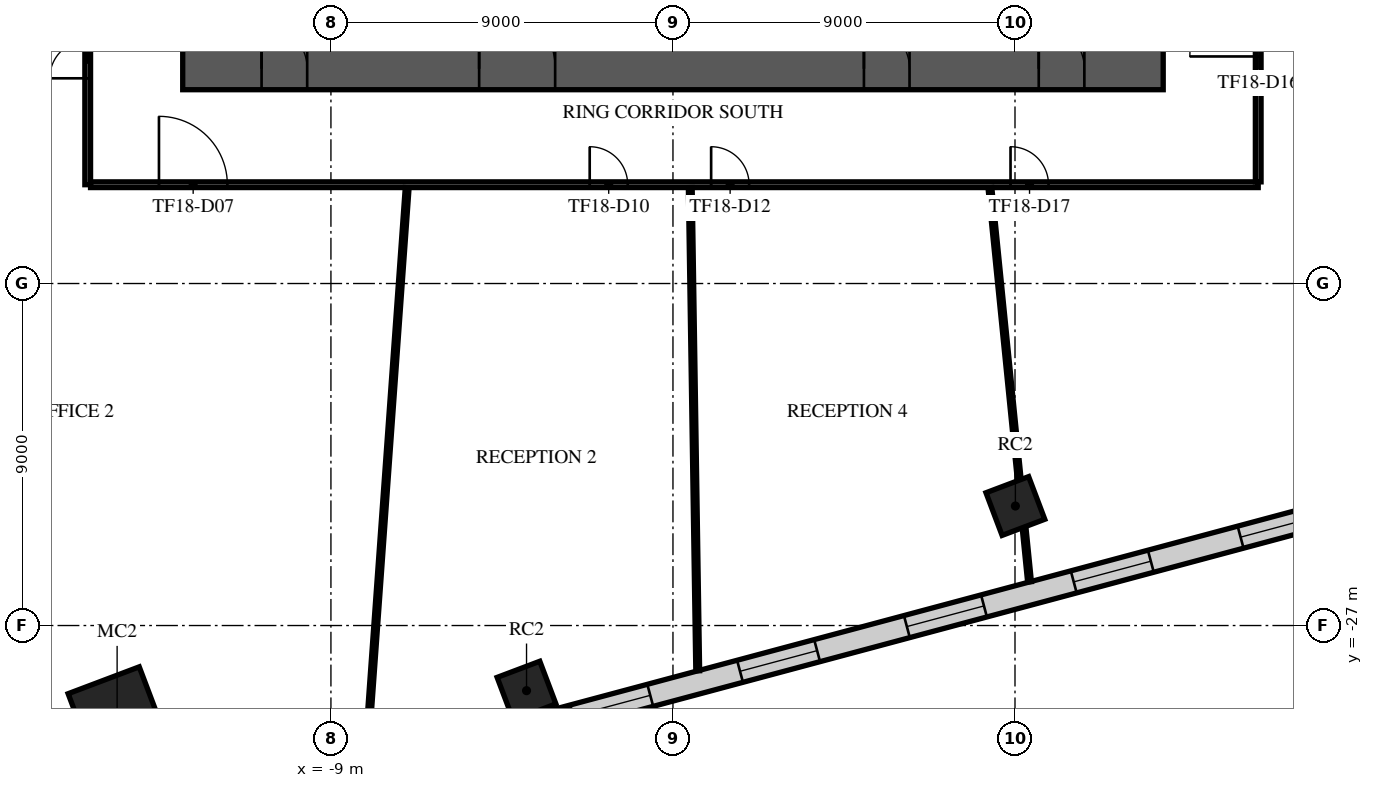
"""IFC4 building model, lengths in metres.
Left out: names, types, materials, properties, quantities, classifications, styles, units other than length and angle.
Written with IfcOpenShell. Run it as: python <this file> out.ifc"""

import sys

from ifc_helpers import new_model, si_unit, direction, frame, frame_2d, origin, origin_2d, place, context, subcontext, project, spatial, rectangle, extrude, element, fill, save


model = new_model("IFC4")
c1 = context("Model", 3, precision=1e-05, world=origin(), true_north=direction((0.0, 1.0)))
c2 = subcontext(c1, "Body", "Model", "MODEL_VIEW")
j1 = project(units=[si_unit("LENGTHUNIT", "METRE"), si_unit("PLANEANGLEUNIT", "RADIAN")], contexts=[c1])
p1 = place(None, origin())
s1 = spatial("IfcSite", under=j1, at=p1, CompositionType="ELEMENT")
p2 = place(p1, origin())
s2 = spatial("IfcBuilding", under=s1, at=p2, CompositionType="ELEMENT")
p3 = place(p2, frame((0.0, 0.0, 86.1)))
s3 = spatial("IfcBuildingStorey", under=s2, at=p3, CompositionType="ELEMENT", Elevation=86.1)
p4 = place(p3, frame((-14.626, -29.376, 0.0), z_axis=(0.0, 0.0, 1.0), x_axis=(0.935491525991, 0.353349125935, 0.0)))
e1 = element("IfcColumn", 1, at=p4, inside=s3, PredefinedType="COLUMN", context=c2, shape_type="SweptSolid", body=[
    extrude(rectangle(XDim=2.0, YDim=2.0, at=origin_2d()), origin(), (0.0, 0.0, 1.0), 4.0),
])
for number, where, z_axis, x_axis in (
    (2, (-3.853, -28.714, 0.0), (0.0, 0.0, 1.0), (0.935, 0.353, 0.0)),
    (3, (9.01, -23.855, 0.0), (0.0, 0.0, 1.0), (0.935, 0.353, 0.0)),
):
    element("IfcColumn", number, at=place(p3, frame(where, z_axis=z_axis, x_axis=x_axis)), inside=s3, PredefinedType="COLUMN", context=c2, shape_type="SweptSolid", body=[
        extrude(rectangle(XDim=1.2, YDim=1.2, at=origin_2d()), origin(), (0.0, 0.0, 1.0), 4.0),
    ])
p5 = place(p3, frame((-12.9, -12.35, 0.0), z_axis=(0.0, 0.0, 1.0), x_axis=(1.0, 0.0, 0.0)))
e4 = element("IfcWall", 4, at=p5, inside=s3, PredefinedType="SHEAR", context=c2, shape_type="SweptSolid", body=[
    extrude(rectangle(XDim=25.8, YDim=1.1, at=frame_2d((12.9, 0.0))), origin(), (0.0, 0.0, 1.0), 3.58),
])
p6 = place(p5, frame((7.8, 0.0, 0.0)))
e5 = element("IfcOpeningElement", 5, at=p6, cuts=e4, PredefinedType="OPENING", context=c2, shape_type="SweptSolid", body=[
    extrude(rectangle(XDim=2.0, YDim=2.1, at=frame_2d((1.0, 1.05))), frame((0.0, 0.56, 0.0), z_axis=(0.0, -1.0, 0.0), x_axis=(1.0, 0.0, 0.0)), (0.0, 0.0, 1.0), 1.12),
])
p7 = place(p5, frame((17.925, 0.0, 0.0)))
e6 = element("IfcOpeningElement", 6, at=p7, cuts=e4, PredefinedType="OPENING", context=c2, shape_type="SweptSolid", body=[
    extrude(rectangle(XDim=1.2, YDim=2.1, at=frame_2d((0.6, 1.05))), frame((0.0, 0.56, 0.0), z_axis=(0.0, -1.0, 0.0), x_axis=(1.0, 0.0, 0.0)), (0.0, 0.0, 1.0), 1.12),
])
p8 = place(p5, frame((2.075, 0.0, 0.0)))
e7 = element("IfcOpeningElement", 7, at=p8, cuts=e4, PredefinedType="OPENING", context=c2, shape_type="SweptSolid", body=[
    extrude(rectangle(XDim=1.2, YDim=2.1, at=frame_2d((0.6, 1.05))), frame((0.0, 0.56, 0.0), z_axis=(0.0, -1.0, 0.0), x_axis=(1.0, 0.0, 0.0)), (0.0, 0.0, 1.0), 1.12),
])
p9 = place(p5, frame((22.525, 0.0, 0.0)))
e8 = element("IfcOpeningElement", 8, at=p9, cuts=e4, PredefinedType="OPENING", context=c2, shape_type="SweptSolid", body=[
    extrude(rectangle(XDim=1.2, YDim=2.1, at=frame_2d((0.6, 1.05))), frame((0.0, 0.56, 0.0), z_axis=(0.0, -1.0, 0.0), x_axis=(1.0, 0.0, 0.0)), (0.0, 0.0, 1.0), 1.12),
])
p10 = place(p3, frame((-16.859, -33.195, 0.0), z_axis=(0.0, 0.0, 1.0), x_axis=(0.965925643605, 0.258819726887, 0.0)))
e9 = element("IfcWall", 9, at=p10, inside=s3, PredefinedType="STANDARD", context=c2, shape_type="SweptSolid", body=[
    extrude(rectangle(XDim=49.752, YDim=0.6, at=frame_2d((24.876, 0.0))), origin(), (0.0, 0.0, 1.0), 3.58),
])
p11 = place(p10, frame((1.161, 0.0, 0.9)))
e10 = element("IfcOpeningElement", 10, at=p11, cuts=e9, PredefinedType="OPENING", context=c2, shape_type="SweptSolid", body=[
    extrude(rectangle(XDim=2.1, YDim=2.1, at=frame_2d((1.05, 1.05))), frame((0.0, 0.31, 0.0), z_axis=(0.0, -1.0, 0.0), x_axis=(1.0, 0.0, 0.0)), (0.0, 0.0, 1.0), 0.62),
])
p12 = place(p10, frame((5.644, 0.0, 0.9)))
e11 = element("IfcOpeningElement", 11, at=p12, cuts=e9, PredefinedType="OPENING", context=c2, shape_type="SweptSolid", body=[
    extrude(rectangle(XDim=2.1, YDim=2.1, at=frame_2d((1.05, 1.05))), frame((0.0, 0.31, 0.0), z_axis=(0.0, -1.0, 0.0), x_axis=(1.0, 0.0, 0.0)), (0.0, 0.0, 1.0), 0.62),
])
p13 = place(p10, frame((10.189, 0.0, 0.9)))
e12 = element("IfcOpeningElement", 12, at=p13, cuts=e9, PredefinedType="OPENING", context=c2, shape_type="SweptSolid", body=[
    extrude(rectangle(XDim=2.1, YDim=2.1, at=frame_2d((1.05, 1.05))), frame((0.0, 0.31, 0.0), z_axis=(0.0, -1.0, 0.0), x_axis=(1.0, 0.0, 0.0)), (0.0, 0.0, 1.0), 0.62),
])
p14 = place(p10, frame((14.735, 0.0, 0.9)))
e13 = element("IfcOpeningElement", 13, at=p14, cuts=e9, PredefinedType="OPENING", context=c2, shape_type="SweptSolid", body=[
    extrude(rectangle(XDim=2.1, YDim=2.1, at=frame_2d((1.05, 1.05))), frame((0.0, 0.31, 0.0), z_axis=(0.0, -1.0, 0.0), x_axis=(1.0, 0.0, 0.0)), (0.0, 0.0, 1.0), 0.62),
])
p15 = place(p10, frame((19.28, 0.0, 0.9)))
e14 = element("IfcOpeningElement", 14, at=p15, cuts=e9, PredefinedType="OPENING", context=c2, shape_type="SweptSolid", body=[
    extrude(rectangle(XDim=2.1, YDim=2.1, at=frame_2d((1.05, 1.05))), frame((0.0, 0.31, 0.0), z_axis=(0.0, -1.0, 0.0), x_axis=(1.0, 0.0, 0.0)), (0.0, 0.0, 1.0), 0.62),
])
p16 = place(p10, frame((23.826, 0.0, 0.9)))
e15 = element("IfcOpeningElement", 15, at=p16, cuts=e9, PredefinedType="OPENING", context=c2, shape_type="SweptSolid", body=[
    extrude(rectangle(XDim=2.1, YDim=2.1, at=frame_2d((1.05, 1.05))), frame((0.0, 0.31, 0.0), z_axis=(0.0, -1.0, 0.0), x_axis=(1.0, 0.0, 0.0)), (0.0, 0.0, 1.0), 0.62),
])
p17 = place(p10, frame((28.371, 0.0, 0.9)))
e16 = element("IfcOpeningElement", 16, at=p17, cuts=e9, PredefinedType="OPENING", context=c2, shape_type="SweptSolid", body=[
    extrude(rectangle(XDim=2.1, YDim=2.1, at=frame_2d((1.05, 1.05))), frame((0.0, 0.31, 0.0), z_axis=(0.0, -1.0, 0.0), x_axis=(1.0, 0.0, 0.0)), (0.0, 0.0, 1.0), 0.62),
])
p18 = place(p10, frame((32.917, 0.0, 0.9)))
e17 = element("IfcOpeningElement", 17, at=p18, cuts=e9, PredefinedType="OPENING", context=c2, shape_type="SweptSolid", body=[
    extrude(rectangle(XDim=2.1, YDim=2.1, at=frame_2d((1.05, 1.05))), frame((0.0, 0.31, 0.0), z_axis=(0.0, -1.0, 0.0), x_axis=(1.0, 0.0, 0.0)), (0.0, 0.0, 1.0), 0.62),
])
p19 = place(p10, frame((37.462, 0.0, 0.9)))
e18 = element("IfcOpeningElement", 18, at=p19, cuts=e9, PredefinedType="OPENING", context=c2, shape_type="SweptSolid", body=[
    extrude(rectangle(XDim=2.1, YDim=2.1, at=frame_2d((1.05, 1.05))), frame((0.0, 0.31, 0.0), z_axis=(0.0, -1.0, 0.0), x_axis=(1.0, 0.0, 0.0)), (0.0, 0.0, 1.0), 0.62),
])
p20 = place(p10, frame((42.008, 0.0, 0.9)))
e19 = element("IfcOpeningElement", 19, at=p20, cuts=e9, PredefinedType="OPENING", context=c2, shape_type="SweptSolid", body=[
    extrude(rectangle(XDim=2.1, YDim=2.1, at=frame_2d((1.05, 1.05))), frame((0.0, 0.31, 0.0), z_axis=(0.0, -1.0, 0.0), x_axis=(1.0, 0.0, 0.0)), (0.0, 0.0, 1.0), 0.62),
])
p21 = place(p10, frame((46.491, 0.0, 0.9)))
e20 = element("IfcOpeningElement", 20, at=p21, cuts=e9, PredefinedType="OPENING", context=c2, shape_type="SweptSolid", body=[
    extrude(rectangle(XDim=2.1, YDim=2.1, at=frame_2d((1.05, 1.05))), frame((0.0, 0.31, 0.0), z_axis=(0.0, -1.0, 0.0), x_axis=(1.0, 0.0, 0.0)), (0.0, 0.0, 1.0), 0.62),
])
p22 = place(p3, frame((-15.4, -15.4, 0.0), z_axis=(0.0, 0.0, 1.0), x_axis=(0.0, 1.0, 0.0)))
e21 = element("IfcWall", 21, at=p22, inside=s3, PredefinedType="PARTITIONING", context=c2, shape_type="SweptSolid", body=[
    extrude(rectangle(XDim=30.8, YDim=0.15, at=frame_2d((15.4, 0.0))), origin(), (0.0, 0.0, 1.0), 3.08),
])
p23 = place(p22, frame((21.677, 0.0, 0.0)))
e22 = element("IfcOpeningElement", 22, at=p23, cuts=e21, PredefinedType="OPENING", context=c2, shape_type="SweptSolid", body=[
    extrude(rectangle(XDim=1.8, YDim=2.1, at=frame_2d((0.9, 1.05))), frame((0.0, 0.085, 0.0), z_axis=(0.0, -1.0, 0.0), x_axis=(1.0, 0.0, 0.0)), (0.0, 0.0, 1.0), 0.17),
])
p24 = place(p22, frame((17.927, 0.0, 0.0)))
e23 = element("IfcOpeningElement", 23, at=p24, cuts=e21, PredefinedType="OPENING", context=c2, shape_type="SweptSolid", body=[
    extrude(rectangle(XDim=1.0, YDim=2.1, at=frame_2d((0.5, 1.05))), frame((0.0, 0.085, 0.0), z_axis=(0.0, -1.0, 0.0), x_axis=(1.0, 0.0, 0.0)), (0.0, 0.0, 1.0), 0.17),
])
p25 = place(p22, frame((15.322, 0.0, 0.0)))
e24 = element("IfcOpeningElement", 24, at=p25, cuts=e21, PredefinedType="OPENING", context=c2, shape_type="SweptSolid", body=[
    extrude(rectangle(XDim=1.0, YDim=2.1, at=frame_2d((0.5, 1.05))), frame((0.0, 0.085, 0.0), z_axis=(0.0, -1.0, 0.0), x_axis=(1.0, 0.0, 0.0)), (0.0, 0.0, 1.0), 0.17),
])
p26 = place(p22, frame((6.348, 0.0, 0.0)))
e25 = element("IfcOpeningElement", 25, at=p26, cuts=e21, PredefinedType="OPENING", context=c2, shape_type="SweptSolid", body=[
    extrude(rectangle(XDim=1.0, YDim=2.1, at=frame_2d((0.5, 1.05))), frame((0.0, 0.085, 0.0), z_axis=(0.0, -1.0, 0.0), x_axis=(1.0, 0.0, 0.0)), (0.0, 0.0, 1.0), 0.17),
])
p27 = place(p22, frame((27.605, 0.0, 0.0)))
e26 = element("IfcOpeningElement", 26, at=p27, cuts=e21, PredefinedType="OPENING", context=c2, shape_type="SweptSolid", body=[
    extrude(rectangle(XDim=1.0, YDim=2.1, at=frame_2d((0.5, 1.05))), frame((0.0, 0.085, 0.0), z_axis=(0.0, -1.0, 0.0), x_axis=(1.0, 0.0, 0.0)), (0.0, 0.0, 1.0), 0.17),
])
p28 = place(p22, frame((2.8, 0.0, 0.0)))
e27 = element("IfcOpeningElement", 27, at=p28, cuts=e21, PredefinedType="OPENING", context=c2, shape_type="SweptSolid", body=[
    extrude(rectangle(XDim=1.0, YDim=2.1, at=frame_2d((0.5, 1.05))), frame((0.0, 0.085, 0.0), z_axis=(0.0, -1.0, 0.0), x_axis=(1.0, 0.0, 0.0)), (0.0, 0.0, 1.0), 0.17),
])
p29 = place(p3, frame((-15.325, -15.4, 0.0), z_axis=(0.0, 0.0, 1.0), x_axis=(1.0, 0.0, 0.0)))
e28 = element("IfcWall", 28, at=p29, inside=s3, PredefinedType="PARTITIONING", context=c2, shape_type="SweptSolid", body=[
    extrude(rectangle(XDim=30.725, YDim=0.15, at=frame_2d((15.362, 0.0))), origin(), (0.0, 0.0, 1.0), 3.08),
])
p30 = place(p29, frame((1.8, 0.0, 0.0)))
e29 = element("IfcOpeningElement", 29, at=p30, cuts=e28, PredefinedType="OPENING", context=c2, shape_type="SweptSolid", body=[
    extrude(rectangle(XDim=1.8, YDim=2.1, at=frame_2d((0.9, 1.05))), frame((0.0, 0.085, 0.0), z_axis=(0.0, -1.0, 0.0), x_axis=(1.0, 0.0, 0.0)), (0.0, 0.0, 1.0), 0.17),
])
p31 = place(p29, frame((13.134, 0.0, 0.0)))
e30 = element("IfcOpeningElement", 30, at=p31, cuts=e28, PredefinedType="OPENING", context=c2, shape_type="SweptSolid", body=[
    extrude(rectangle(XDim=1.0, YDim=2.1, at=frame_2d((0.5, 1.05))), frame((0.0, 0.085, 0.0), z_axis=(0.0, -1.0, 0.0), x_axis=(1.0, 0.0, 0.0)), (0.0, 0.0, 1.0), 0.17),
])
p32 = place(p29, frame((16.329, 0.0, 0.0)))
e31 = element("IfcOpeningElement", 31, at=p32, cuts=e28, PredefinedType="OPENING", context=c2, shape_type="SweptSolid", body=[
    extrude(rectangle(XDim=1.0, YDim=2.1, at=frame_2d((0.5, 1.05))), frame((0.0, 0.085, 0.0), z_axis=(0.0, -1.0, 0.0), x_axis=(1.0, 0.0, 0.0)), (0.0, 0.0, 1.0), 0.17),
])
p33 = place(p29, frame((24.208, 0.0, 0.0)))
e32 = element("IfcOpeningElement", 32, at=p33, cuts=e28, PredefinedType="OPENING", context=c2, shape_type="SweptSolid", body=[
    extrude(rectangle(XDim=1.0, YDim=2.1, at=frame_2d((0.5, 1.05))), frame((0.0, 0.085, 0.0), z_axis=(0.0, -1.0, 0.0), x_axis=(1.0, 0.0, 0.0)), (0.0, 0.0, 1.0), 0.17),
])
p34 = place(p3, frame((15.4, -15.325, 0.0), z_axis=(0.0, 0.0, 1.0), x_axis=(0.0, 1.0, 0.0)))
e33 = element("IfcWall", 33, at=p34, inside=s3, PredefinedType="PARTITIONING", context=c2, shape_type="SweptSolid", body=[
    extrude(rectangle(XDim=30.65, YDim=0.15, at=frame_2d((15.325, 0.0))), origin(), (0.0, 0.0, 1.0), 3.08),
])
p35 = place(p34, frame((24.14, 0.0, 0.0)))
e34 = element("IfcOpeningElement", 34, at=p35, cuts=e33, PredefinedType="OPENING", context=c2, shape_type="SweptSolid", body=[
    extrude(rectangle(XDim=1.8, YDim=2.1, at=frame_2d((0.9, 1.05))), frame((0.0, 0.085, 0.0), z_axis=(0.0, -1.0, 0.0), x_axis=(1.0, 0.0, 0.0)), (0.0, 0.0, 1.0), 0.17),
])
p36 = place(p34, frame((3.3, 0.0, 0.0)))
e35 = element("IfcOpeningElement", 35, at=p36, cuts=e33, PredefinedType="OPENING", context=c2, shape_type="SweptSolid", body=[
    extrude(rectangle(XDim=1.8, YDim=2.1, at=frame_2d((0.9, 1.05))), frame((0.0, 0.085, 0.0), z_axis=(0.0, -1.0, 0.0), x_axis=(1.0, 0.0, 0.0)), (0.0, 0.0, 1.0), 0.17),
])
p37 = place(p34, frame((19.191, 0.0, 0.0)))
e36 = element("IfcOpeningElement", 36, at=p37, cuts=e33, PredefinedType="OPENING", context=c2, shape_type="SweptSolid", body=[
    extrude(rectangle(XDim=1.0, YDim=2.1, at=frame_2d((0.5, 1.05))), frame((0.0, 0.085, 0.0), z_axis=(0.0, -1.0, 0.0), x_axis=(1.0, 0.0, 0.0)), (0.0, 0.0, 1.0), 0.17),
])
p38 = place(p34, frame((10.963, 0.0, 0.0)))
e37 = element("IfcOpeningElement", 37, at=p38, cuts=e33, PredefinedType="OPENING", context=c2, shape_type="SweptSolid", body=[
    extrude(rectangle(XDim=1.0, YDim=2.1, at=frame_2d((0.5, 1.05))), frame((0.0, 0.085, 0.0), z_axis=(0.0, -1.0, 0.0), x_axis=(1.0, 0.0, 0.0)), (0.0, 0.0, 1.0), 0.17),
])
p39 = place(p3, frame((-27.178, -12.154, 0.0), z_axis=(0.0, 0.0, 1.0), x_axis=(0.996016470741, 0.089169445512, 0.0)))
e38 = element("IfcWall", 38, at=p39, inside=s3, PredefinedType="PARTITIONING", context=c2, shape_type="SweptSolid", body=[
    extrude(rectangle(XDim=11.746, YDim=0.1, at=frame_2d((5.873, 0.0))), origin(), (0.0, 0.0, 1.0), 3.58),
])
p40 = place(p3, frame((-8.074, -30.528, 0.0), z_axis=(0.0, 0.0, 1.0), x_axis=(0.071616164184, 0.997432265885, 0.0)))
e39 = element("IfcWall", 39, at=p40, inside=s3, PredefinedType="PARTITIONING", context=c2, shape_type="SweptSolid", body=[
    extrude(rectangle(XDim=15.088, YDim=0.1, at=frame_2d((7.544, 0.0))), origin(), (0.0, 0.0, 1.0), 3.58),
])
p41 = place(p3, frame((0.455, -15.476, 0.0), z_axis=(0.0, 0.0, 1.0), x_axis=(0.015436837746, -0.999880844921, 0.0)))
e40 = element("IfcWall", 40, at=p41, inside=s3, PredefinedType="PARTITIONING", context=c2, shape_type="SweptSolid", body=[
    extrude(rectangle(XDim=12.716, YDim=0.1, at=frame_2d((6.358, 0.0))), origin(), (0.0, 0.0, 1.0), 3.58),
])
p42 = place(p3, frame((8.34, -15.48, 0.0), z_axis=(0.0, 0.0, 1.0), x_axis=(0.09998194497, -0.99498925154, 0.0)))
e41 = element("IfcWall", 41, at=p42, inside=s3, PredefinedType="PARTITIONING", context=c2, shape_type="SweptSolid", body=[
    extrude(rectangle(XDim=7.733, YDim=0.1, at=frame_2d((3.867, 0.0))), origin(), (0.0, 0.0, 1.0), 2.96),
])
p43 = place(p3, frame((9.237, -24.41, 0.0), z_axis=(0.0, 0.0, 1.0), x_axis=(0.100021406051, -0.994985285485, 0.0)))
e42 = element("IfcWall", 42, at=p43, inside=s3, PredefinedType="PARTITIONING", context=c2, shape_type="SweptSolid", body=[
    extrude(rectangle(XDim=1.448, YDim=0.1, at=frame_2d((0.724, 0.0))), origin(), (0.0, 0.0, 1.0), 3.58),
])
p44 = place(p6, origin())
e43 = element("IfcDoor", 43, at=p44, inside=s3, OperationType="SINGLE_SWING_LEFT", PredefinedType="DOOR", context=c2, shape_type="SweptSolid", body=[
    extrude(rectangle(XDim=2.0, YDim=2.1, at=frame_2d((1.0, 1.05))), frame((0.0, 0.025, 0.0), z_axis=(0.0, -1.0, 0.0), x_axis=(1.0, 0.0, 0.0)), (0.0, 0.0, 1.0), 0.05),
])
fill(e5, e43)
p45 = place(p7, origin())
e44 = element("IfcDoor", 44, at=p45, inside=s3, OperationType="SINGLE_SWING_LEFT", PredefinedType="DOOR", context=c2, shape_type="SweptSolid", body=[
    extrude(rectangle(XDim=1.2, YDim=2.1, at=frame_2d((0.6, 1.05))), frame((0.0, 0.025, 0.0), z_axis=(0.0, -1.0, 0.0), x_axis=(1.0, 0.0, 0.0)), (0.0, 0.0, 1.0), 0.05),
])
fill(e6, e44)
p46 = place(p8, origin())
e45 = element("IfcDoor", 45, at=p46, inside=s3, OperationType="SINGLE_SWING_LEFT", PredefinedType="DOOR", context=c2, shape_type="SweptSolid", body=[
    extrude(rectangle(XDim=1.2, YDim=2.1, at=frame_2d((0.6, 1.05))), frame((0.0, 0.025, 0.0), z_axis=(0.0, -1.0, 0.0), x_axis=(1.0, 0.0, 0.0)), (0.0, 0.0, 1.0), 0.05),
])
fill(e7, e45)
p47 = place(p9, origin())
e46 = element("IfcDoor", 46, at=p47, inside=s3, OperationType="SINGLE_SWING_LEFT", PredefinedType="DOOR", context=c2, shape_type="SweptSolid", body=[
    extrude(rectangle(XDim=1.2, YDim=2.1, at=frame_2d((0.6, 1.05))), frame((0.0, 0.025, 0.0), z_axis=(0.0, -1.0, 0.0), x_axis=(1.0, 0.0, 0.0)), (0.0, 0.0, 1.0), 0.05),
])
fill(e8, e46)
p48 = place(p14, origin())
e47 = element("IfcWindow", 47, at=p48, inside=s3, PartitioningType="SINGLE_PANEL", PredefinedType="WINDOW", context=c2, shape_type="SweptSolid", body=[
    extrude(rectangle(XDim=2.1, YDim=2.1, at=frame_2d((1.05, 1.05))), frame((0.0, 0.03, 0.0), z_axis=(0.0, -1.0, 0.0), x_axis=(1.0, 0.0, 0.0)), (0.0, 0.0, 1.0), 0.06),
])
fill(e13, e47)
p49 = place(p15, origin())
e48 = element("IfcWindow", 48, at=p49, inside=s3, PartitioningType="SINGLE_PANEL", PredefinedType="WINDOW", context=c2, shape_type="SweptSolid", body=[
    extrude(rectangle(XDim=2.1, YDim=2.1, at=frame_2d((1.05, 1.05))), frame((0.0, 0.03, 0.0), z_axis=(0.0, -1.0, 0.0), x_axis=(1.0, 0.0, 0.0)), (0.0, 0.0, 1.0), 0.06),
])
fill(e14, e48)
p50 = place(p16, origin())
e49 = element("IfcWindow", 49, at=p50, inside=s3, PartitioningType="SINGLE_PANEL", PredefinedType="WINDOW", context=c2, shape_type="SweptSolid", body=[
    extrude(rectangle(XDim=2.1, YDim=2.1, at=frame_2d((1.05, 1.05))), frame((0.0, 0.03, 0.0), z_axis=(0.0, -1.0, 0.0), x_axis=(1.0, 0.0, 0.0)), (0.0, 0.0, 1.0), 0.06),
])
fill(e15, e49)
p51 = place(p17, origin())
e50 = element("IfcWindow", 50, at=p51, inside=s3, PartitioningType="SINGLE_PANEL", PredefinedType="WINDOW", context=c2, shape_type="SweptSolid", body=[
    extrude(rectangle(XDim=2.1, YDim=2.1, at=frame_2d((1.05, 1.05))), frame((0.0, 0.03, 0.0), z_axis=(0.0, -1.0, 0.0), x_axis=(1.0, 0.0, 0.0)), (0.0, 0.0, 1.0), 0.06),
])
fill(e16, e50)
p52 = place(p18, origin())
e51 = element("IfcWindow", 51, at=p52, inside=s3, PartitioningType="SINGLE_PANEL", PredefinedType="WINDOW", context=c2, shape_type="SweptSolid", body=[
    extrude(rectangle(XDim=2.1, YDim=2.1, at=frame_2d((1.05, 1.05))), frame((0.0, 0.03, 0.0), z_axis=(0.0, -1.0, 0.0), x_axis=(1.0, 0.0, 0.0)), (0.0, 0.0, 1.0), 0.06),
])
fill(e17, e51)
p53 = place(p30, frame((1.8, 0.0, 0.0), z_axis=(0.0, 0.0, 1.0), x_axis=(-1.0, 0.0, 0.0)))
e52 = element("IfcDoor", 52, at=p53, inside=s3, OperationType="DOUBLE_DOOR_SINGLE_SWING", PredefinedType="DOOR", context=c2, shape_type="SweptSolid", body=[
    extrude(rectangle(XDim=1.8, YDim=2.1, at=frame_2d((0.9, 1.05))), frame((0.0, 0.025, 0.0), z_axis=(0.0, -1.0, 0.0), x_axis=(1.0, 0.0, 0.0)), (0.0, 0.0, 1.0), 0.05),
])
fill(e29, e52)
p54 = place(p28, origin())
e53 = element("IfcDoor", 53, at=p54, inside=s3, OperationType="SINGLE_SWING_LEFT", PredefinedType="DOOR", context=c2, shape_type="SweptSolid", body=[
    extrude(rectangle(XDim=1.0, YDim=2.1, at=frame_2d((0.5, 1.05))), frame((0.0, 0.025, 0.0), z_axis=(0.0, -1.0, 0.0), x_axis=(1.0, 0.0, 0.0)), (0.0, 0.0, 1.0), 0.05),
])
fill(e27, e53)
p55 = place(p31, frame((1.0, 0.0, 0.0), z_axis=(0.0, 0.0, 1.0), x_axis=(-1.0, 0.0, 0.0)))
e54 = element("IfcDoor", 54, at=p55, inside=s3, OperationType="SINGLE_SWING_LEFT", PredefinedType="DOOR", context=c2, shape_type="SweptSolid", body=[
    extrude(rectangle(XDim=1.0, YDim=2.1, at=frame_2d((0.5, 1.05))), frame((0.0, 0.025, 0.0), z_axis=(0.0, -1.0, 0.0), x_axis=(1.0, 0.0, 0.0)), (0.0, 0.0, 1.0), 0.05),
])
fill(e30, e54)
p56 = place(p32, frame((1.0, 0.0, 0.0), z_axis=(0.0, 0.0, 1.0), x_axis=(-1.0, 0.0, 0.0)))
e55 = element("IfcDoor", 55, at=p56, inside=s3, OperationType="SINGLE_SWING_RIGHT", PredefinedType="DOOR", context=c2, shape_type="SweptSolid", body=[
    extrude(rectangle(XDim=1.0, YDim=2.1, at=frame_2d((0.5, 1.05))), frame((0.0, 0.025, 0.0), z_axis=(0.0, -1.0, 0.0), x_axis=(1.0, 0.0, 0.0)), (0.0, 0.0, 1.0), 0.05),
])
fill(e31, e55)
p57 = place(p36, frame((1.8, 0.0, 0.0), z_axis=(0.0, 0.0, 1.0), x_axis=(-1.0, 0.0, 0.0)))
e56 = element("IfcDoor", 56, at=p57, inside=s3, OperationType="DOUBLE_DOOR_SINGLE_SWING", PredefinedType="DOOR", context=c2, shape_type="SweptSolid", body=[
    extrude(rectangle(XDim=1.8, YDim=2.1, at=frame_2d((0.9, 1.05))), frame((0.0, 0.025, 0.0), z_axis=(0.0, -1.0, 0.0), x_axis=(1.0, 0.0, 0.0)), (0.0, 0.0, 1.0), 0.05),
])
fill(e35, e56)
p58 = place(p33, frame((1.0, 0.0, 0.0), z_axis=(0.0, 0.0, 1.0), x_axis=(-1.0, 0.0, 0.0)))
e57 = element("IfcDoor", 57, at=p58, inside=s3, OperationType="SINGLE_SWING_LEFT", PredefinedType="DOOR", context=c2, shape_type="SweptSolid", body=[
    extrude(rectangle(XDim=1.0, YDim=2.1, at=frame_2d((0.5, 1.05))), frame((0.0, 0.025, 0.0), z_axis=(0.0, -1.0, 0.0), x_axis=(1.0, 0.0, 0.0)), (0.0, 0.0, 1.0), 0.05),
])
fill(e32, e57)
save(model, sys.argv[1])
